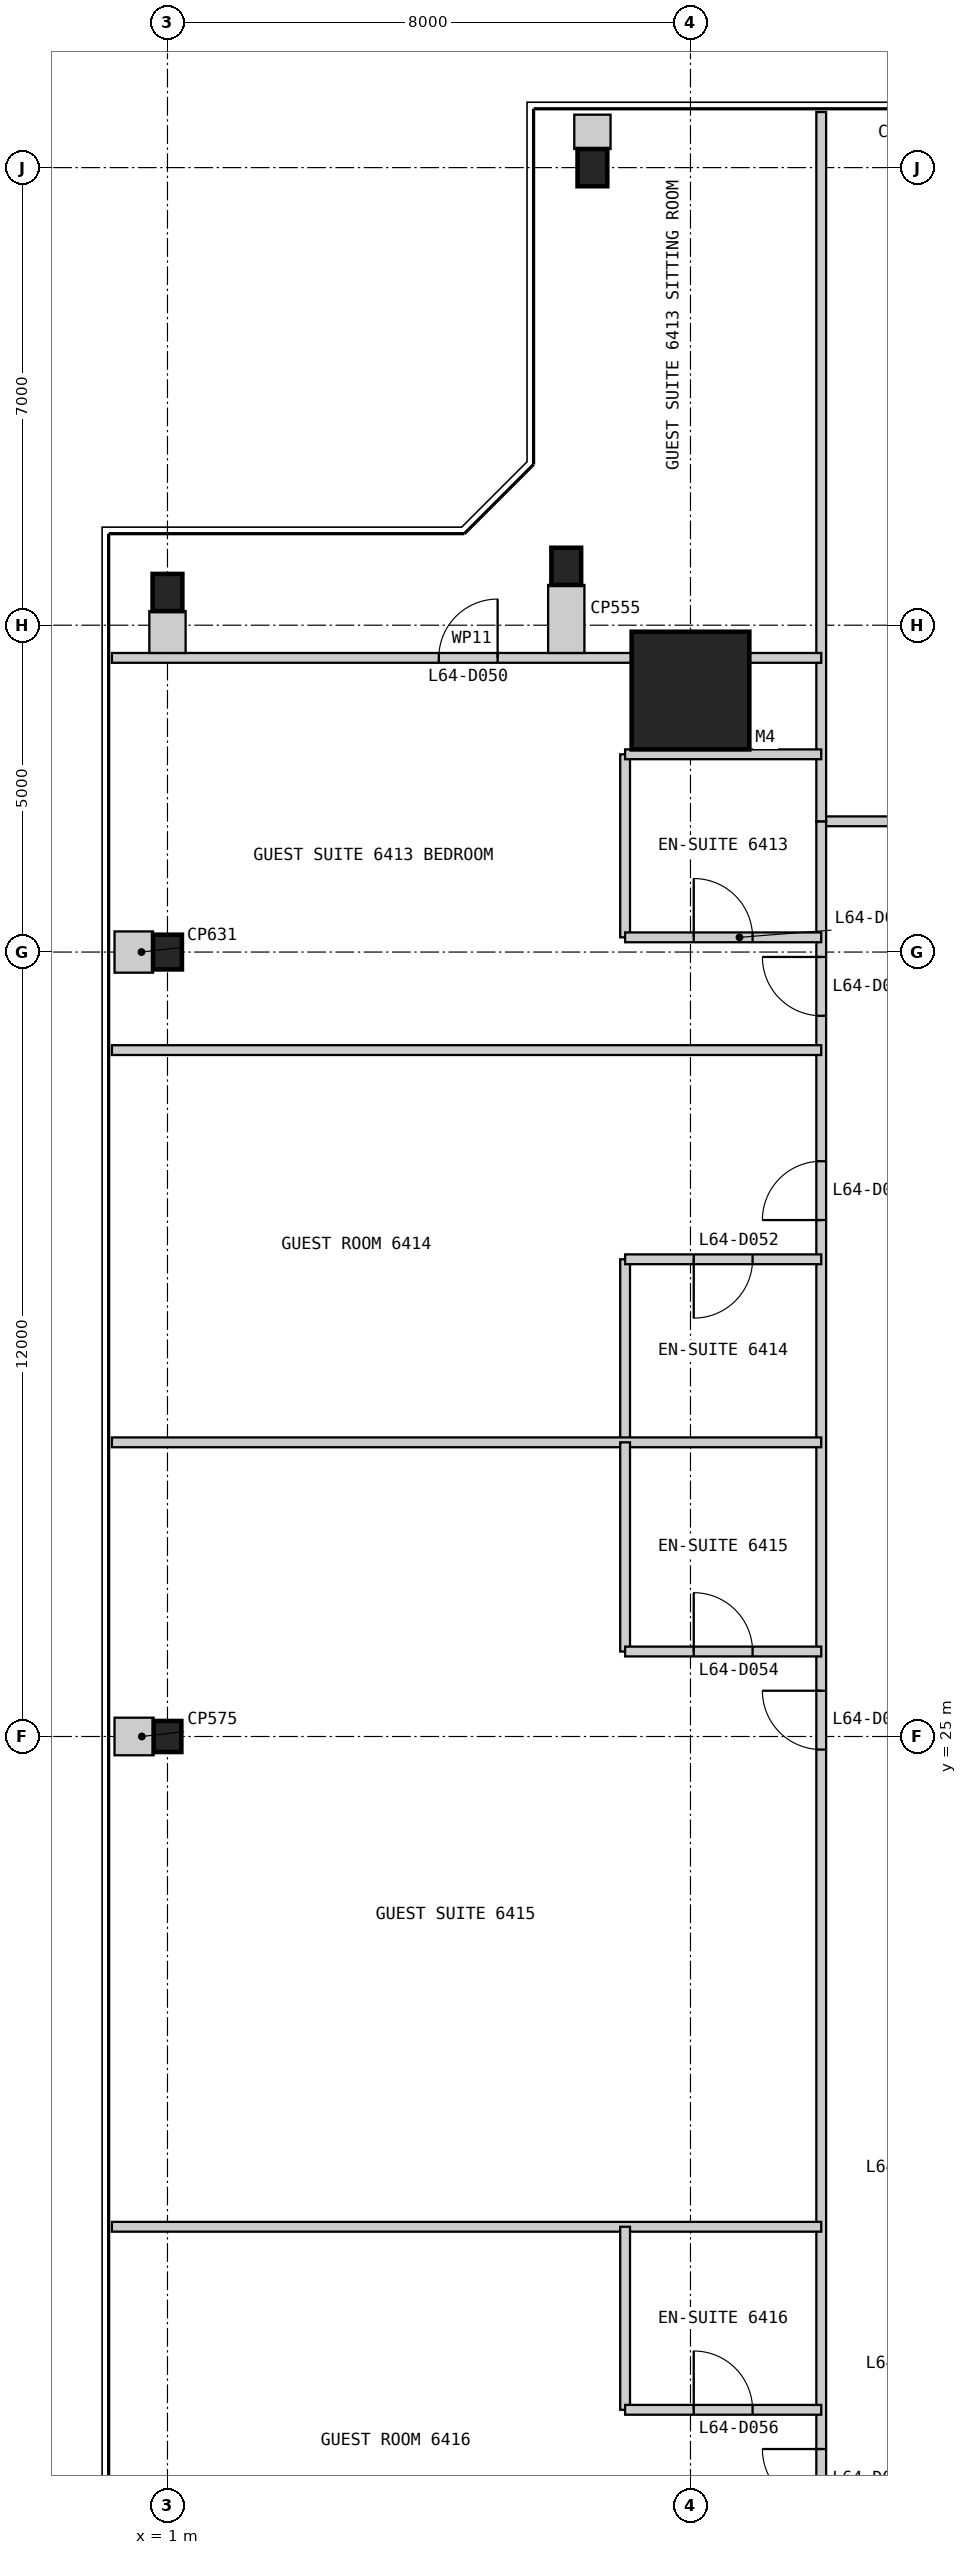
"""IFC4 building model, lengths in metres.
Left out: names, types, materials, properties, quantities, classifications, styles, units other than length and angle.
Written with IfcOpenShell. Run it as: python <this file> out.ifc"""

import sys

from ifc_helpers import new_model, si_unit, direction, frame, frame_2d, origin, origin_2d, place, context, subcontext, project, spatial, rectangle, i_section, extrude, element, fill, save


model = new_model("IFC4")
c1 = context("Model", 3, precision=1e-05, world=origin(), true_north=direction((0.0, 1.0)))
c2 = subcontext(c1, "Body", "Model", "MODEL_VIEW")
j1 = project(units=[si_unit("LENGTHUNIT", "METRE"), si_unit("PLANEANGLEUNIT", "RADIAN")], contexts=[c1])
p1 = place(None, origin())
s1 = spatial("IfcSite", under=j1, at=p1, CompositionType="ELEMENT")
p2 = place(p1, origin())
s2 = spatial("IfcBuilding", under=s1, at=p2, CompositionType="ELEMENT")
p3 = place(p2, frame((0.0, 0.0, 269.6)))
s3 = spatial("IfcBuildingStorey", under=s2, at=p3, CompositionType="ELEMENT", Elevation=269.6)
p4 = place(p3, frame((9.0, 41.0, 0.0), z_axis=(0.0, 0.0, 1.0), x_axis=(1.0, 0.0, 0.0)))
e1 = element("IfcColumn", 1, at=p4, inside=s3, PredefinedType="COLUMN", context=c2, shape_type="SweptSolid", body=[
    extrude(rectangle(XDim=1.8, YDim=1.8, at=origin_2d()), origin(), (0.0, 0.0, 1.0), 3.4),
])
for number, where, z_axis, x_axis in (
    (2, (7.5, 49.0, 0.0), (0.0, 0.0, 1.0), (1.0, 0.0, 0.0)),
    (3, (7.1, 42.9, 0.0), (0.0, 0.0, 1.0), (1.0, 0.0, 0.0)),
    (4, (1.0, 42.5, 0.0), (0.0, 0.0, 1.0), (1.0, 0.0, 0.0)),
):
    element("IfcColumn", number, at=place(p3, frame(where, z_axis=z_axis, x_axis=x_axis)), inside=s3, PredefinedType="COLUMN", context=c2, shape_type="SweptSolid", body=[
        extrude(i_section(OverallWidth=0.455, OverallDepth=0.569, WebThickness=0.078, FlangeThickness=0.125, at=origin_2d()), origin(), (0.0, 0.0, 1.0), 3.4),
    ])
p5 = place(p3, frame((1.0, 37.0, 0.0), z_axis=(0.0, 0.0, 1.0), x_axis=(1.0, 0.0, 0.0)))
e5 = element("IfcColumn", 5, at=p5, inside=s3, PredefinedType="COLUMN", context=c2, shape_type="SweptSolid", body=[
    extrude(i_section(OverallWidth=0.442, OverallDepth=0.531, WebThickness=0.066, FlangeThickness=0.106, at=origin_2d()), origin(), (0.0, 0.0, 1.0), 3.4),
])
p6 = place(p3, frame((1.0, 25.0, 0.0), z_axis=(0.0, 0.0, 1.0), x_axis=(1.0, 0.0, 0.0)))
e6 = element("IfcColumn", 6, at=p6, inside=s3, PredefinedType="COLUMN", context=c2, shape_type="SweptSolid", body=[
    extrude(i_section(OverallWidth=0.424, OverallDepth=0.475, WebThickness=0.048, FlangeThickness=0.077, at=origin_2d()), origin(), (0.0, 0.0, 1.0), 3.4),
])
p7 = place(p3, frame((39.0, 39.0, 0.0), z_axis=(0.0, 0.0, 1.0), x_axis=(-1.0, 0.0, 0.0)))
e7 = element("IfcWall", 7, at=p7, inside=s3, PredefinedType="PARTITIONING", context=c2, shape_type="SweptSolid", body=[
    extrude(rectangle(XDim=28.0, YDim=0.15, at=frame_2d((14.0, 0.0))), origin(), (0.0, 0.0, 1.0), 2.844),
])
p8 = place(p7, frame((1.9, 0.0, 0.0)))
e8 = element("IfcOpeningElement", 8, at=p8, cuts=e7, PredefinedType="OPENING", context=c2, shape_type="SweptSolid", body=[
    extrude(rectangle(XDim=0.9, YDim=2.1, at=frame_2d((0.45, 1.05))), frame((0.0, 0.085, 0.0), z_axis=(0.0, -1.0, 0.0), x_axis=(1.0, 0.0, 0.0)), (0.0, 0.0, 1.0), 0.17),
])
p9 = place(p7, frame((5.2, 0.0, 0.0)))
e9 = element("IfcOpeningElement", 9, at=p9, cuts=e7, PredefinedType="OPENING", context=c2, shape_type="SweptSolid", body=[
    extrude(rectangle(XDim=0.9, YDim=2.1, at=frame_2d((0.45, 1.05))), frame((0.0, 0.085, 0.0), z_axis=(0.0, -1.0, 0.0), x_axis=(1.0, 0.0, 0.0)), (0.0, 0.0, 1.0), 0.17),
])
p10 = place(p7, frame((13.3, 0.0, 0.0)))
e10 = element("IfcOpeningElement", 10, at=p10, cuts=e7, PredefinedType="OPENING", context=c2, shape_type="SweptSolid", body=[
    extrude(rectangle(XDim=0.9, YDim=2.1, at=frame_2d((0.45, 1.05))), frame((0.0, 0.085, 0.0), z_axis=(0.0, -1.0, 0.0), x_axis=(1.0, 0.0, 0.0)), (0.0, 0.0, 1.0), 0.17),
])
p11 = place(p7, frame((24.9, 0.0, 0.0)))
e11 = element("IfcOpeningElement", 11, at=p11, cuts=e7, PredefinedType="OPENING", context=c2, shape_type="SweptSolid", body=[
    extrude(rectangle(XDim=0.9, YDim=2.1, at=frame_2d((0.45, 1.05))), frame((0.0, 0.085, 0.0), z_axis=(0.0, -1.0, 0.0), x_axis=(1.0, 0.0, 0.0)), (0.0, 0.0, 1.0), 0.17),
])
p12 = place(p3, frame((11.0, 39.0, 0.0), z_axis=(0.0, 0.0, 1.0), x_axis=(0.0, -1.0, 0.0)))
e12 = element("IfcWall", 12, at=p12, inside=s3, PredefinedType="PARTITIONING", context=c2, shape_type="SweptSolid", body=[
    extrude(rectangle(XDim=28.0, YDim=0.15, at=frame_2d((14.0, 0.0))), origin(), (0.0, 0.0, 1.0), 2.844),
])
p13 = place(p12, frame((2.075, 0.0, 0.0)))
e13 = element("IfcOpeningElement", 13, at=p13, cuts=e12, PredefinedType="OPENING", context=c2, shape_type="SweptSolid", body=[
    extrude(rectangle(XDim=0.9, YDim=2.1, at=frame_2d((0.45, 1.05))), frame((0.0, 0.085, 0.0), z_axis=(0.0, -1.0, 0.0), x_axis=(1.0, 0.0, 0.0)), (0.0, 0.0, 1.0), 0.17),
])
p14 = place(p12, frame((5.2, 0.0, 0.0)))
e14 = element("IfcOpeningElement", 14, at=p14, cuts=e12, PredefinedType="OPENING", context=c2, shape_type="SweptSolid", body=[
    extrude(rectangle(XDim=0.9, YDim=2.1, at=frame_2d((0.45, 1.05))), frame((0.0, 0.085, 0.0), z_axis=(0.0, -1.0, 0.0), x_axis=(1.0, 0.0, 0.0)), (0.0, 0.0, 1.0), 0.17),
])
p15 = place(p12, frame((13.3, 0.0, 0.0)))
e15 = element("IfcOpeningElement", 15, at=p15, cuts=e12, PredefinedType="OPENING", context=c2, shape_type="SweptSolid", body=[
    extrude(rectangle(XDim=0.9, YDim=2.1, at=frame_2d((0.45, 1.05))), frame((0.0, 0.085, 0.0), z_axis=(0.0, -1.0, 0.0), x_axis=(1.0, 0.0, 0.0)), (0.0, 0.0, 1.0), 0.17),
])
p16 = place(p12, frame((24.9, 0.0, 0.0)))
e16 = element("IfcOpeningElement", 16, at=p16, cuts=e12, PredefinedType="OPENING", context=c2, shape_type="SweptSolid", body=[
    extrude(rectangle(XDim=0.9, YDim=2.1, at=frame_2d((0.45, 1.05))), frame((0.0, 0.085, 0.0), z_axis=(0.0, -1.0, 0.0), x_axis=(1.0, 0.0, 0.0)), (0.0, 0.0, 1.0), 0.17),
])
p17 = place(p3, frame((11.0, 49.85, 0.0), z_axis=(0.0, 0.0, 1.0), x_axis=(0.0, -1.0, 0.0)))
e17 = element("IfcWall", 17, at=p17, inside=s3, PredefinedType="PARTITIONING", context=c2, shape_type="SweptSolid", body=[
    extrude(rectangle(XDim=10.85, YDim=0.15, at=frame_2d((5.425, 0.0))), origin(), (0.0, 0.0, 1.0), 2.844),
])
p18 = place(p3, frame((8.0, 40.025, 0.0), z_axis=(0.0, 0.0, 1.0), x_axis=(0.0, -1.0, 0.0)))
e18 = element("IfcWall", 18, at=p18, inside=s3, PredefinedType="PARTITIONING", context=c2, shape_type="SweptSolid", body=[
    extrude(rectangle(XDim=2.8, YDim=0.15, at=frame_2d((1.4, 0.0))), origin(), (0.0, 0.0, 1.0), 3.25),
])
p19 = place(p3, frame((8.0, 37.225, 0.0), z_axis=(0.0, 0.0, 1.0), x_axis=(1.0, 0.0, 0.0)))
e19 = element("IfcWall", 19, at=p19, inside=s3, PredefinedType="PARTITIONING", context=c2, shape_type="SweptSolid", body=[
    extrude(rectangle(XDim=3.0, YDim=0.15, at=frame_2d((1.5, 0.0))), origin(), (0.0, 0.0, 1.0), 3.25),
])
p20 = place(p19, frame((1.05, 0.0, 0.0)))
e20 = element("IfcOpeningElement", 20, at=p20, cuts=e19, PredefinedType="OPENING", context=c2, shape_type="SweptSolid", body=[
    extrude(rectangle(XDim=0.9, YDim=2.1, at=frame_2d((0.45, 1.05))), frame((0.0, 0.085, 0.0), z_axis=(0.0, -1.0, 0.0), x_axis=(1.0, 0.0, 0.0)), (0.0, 0.0, 1.0), 0.17),
])
p21 = place(p3, frame((8.0, 40.025, 0.0), z_axis=(0.0, 0.0, 1.0), x_axis=(1.0, 0.0, 0.0)))
e21 = element("IfcWall", 21, at=p21, inside=s3, PredefinedType="PARTITIONING", context=c2, shape_type="SweptSolid", body=[
    extrude(rectangle(XDim=3.0, YDim=0.15, at=frame_2d((1.5, 0.0))), origin(), (0.0, 0.0, 1.0), 3.25),
])
p22 = place(p3, frame((0.15, 41.5, 0.0), z_axis=(0.0, 0.0, 1.0), x_axis=(1.0, 0.0, 0.0)))
e22 = element("IfcWall", 22, at=p22, inside=s3, PredefinedType="PARTITIONING", context=c2, shape_type="SweptSolid", body=[
    extrude(rectangle(XDim=10.85, YDim=0.15, at=frame_2d((5.425, 0.0))), origin(), (0.0, 0.0, 1.0), 3.25),
])
p23 = place(p22, frame((5.0, 0.0, 0.0)))
e23 = element("IfcOpeningElement", 23, at=p23, cuts=e22, PredefinedType="OPENING", context=c2, shape_type="SweptSolid", body=[
    extrude(rectangle(XDim=0.9, YDim=2.1, at=frame_2d((0.45, 1.05))), frame((0.0, 0.085, 0.0), z_axis=(0.0, -1.0, 0.0), x_axis=(1.0, 0.0, 0.0)), (0.0, 0.0, 1.0), 0.17),
])
p24 = place(p3, frame((0.15, 35.5, 0.0), z_axis=(0.0, 0.0, 1.0), x_axis=(1.0, 0.0, 0.0)))
e24 = element("IfcWall", 24, at=p24, inside=s3, PredefinedType="PARTITIONING", context=c2, shape_type="SweptSolid", body=[
    extrude(rectangle(XDim=10.85, YDim=0.15, at=frame_2d((5.425, 0.0))), origin(), (0.0, 0.0, 1.0), 3.25),
])
p25 = place(p3, frame((8.0, 32.3, 0.0), z_axis=(0.0, 0.0, 1.0), x_axis=(0.0, -1.0, 0.0)))
e25 = element("IfcWall", 25, at=p25, inside=s3, PredefinedType="PARTITIONING", context=c2, shape_type="SweptSolid", body=[
    extrude(rectangle(XDim=2.8, YDim=0.15, at=frame_2d((1.4, 0.0))), origin(), (0.0, 0.0, 1.0), 3.25),
])
p26 = place(p3, frame((8.0, 32.3, 0.0), z_axis=(0.0, 0.0, 1.0), x_axis=(1.0, 0.0, 0.0)))
e26 = element("IfcWall", 26, at=p26, inside=s3, PredefinedType="PARTITIONING", context=c2, shape_type="SweptSolid", body=[
    extrude(rectangle(XDim=3.0, YDim=0.15, at=frame_2d((1.5, 0.0))), origin(), (0.0, 0.0, 1.0), 3.25),
])
p27 = place(p26, frame((1.05, 0.0, 0.0)))
e27 = element("IfcOpeningElement", 27, at=p27, cuts=e26, PredefinedType="OPENING", context=c2, shape_type="SweptSolid", body=[
    extrude(rectangle(XDim=0.9, YDim=2.1, at=frame_2d((0.45, 1.05))), frame((0.0, 0.085, 0.0), z_axis=(0.0, -1.0, 0.0), x_axis=(1.0, 0.0, 0.0)), (0.0, 0.0, 1.0), 0.17),
])
p28 = place(p3, frame((0.15, 29.5, 0.0), z_axis=(0.0, 0.0, 1.0), x_axis=(1.0, 0.0, 0.0)))
e28 = element("IfcWall", 28, at=p28, inside=s3, PredefinedType="PARTITIONING", context=c2, shape_type="SweptSolid", body=[
    extrude(rectangle(XDim=10.85, YDim=0.15, at=frame_2d((5.425, 0.0))), origin(), (0.0, 0.0, 1.0), 3.25),
])
p29 = place(p3, frame((8.0, 29.5, 0.0), z_axis=(0.0, 0.0, 1.0), x_axis=(0.0, -1.0, 0.0)))
e29 = element("IfcWall", 29, at=p29, inside=s3, PredefinedType="PARTITIONING", context=c2, shape_type="SweptSolid", body=[
    extrude(rectangle(XDim=3.2, YDim=0.15, at=frame_2d((1.6, 0.0))), origin(), (0.0, 0.0, 1.0), 3.25),
])
p30 = place(p3, frame((8.0, 26.3, 0.0), z_axis=(0.0, 0.0, 1.0), x_axis=(1.0, 0.0, 0.0)))
e30 = element("IfcWall", 30, at=p30, inside=s3, PredefinedType="PARTITIONING", context=c2, shape_type="SweptSolid", body=[
    extrude(rectangle(XDim=3.0, YDim=0.15, at=frame_2d((1.5, 0.0))), origin(), (0.0, 0.0, 1.0), 3.25),
])
p31 = place(p30, frame((1.05, 0.0, 0.0)))
e31 = element("IfcOpeningElement", 31, at=p31, cuts=e30, PredefinedType="OPENING", context=c2, shape_type="SweptSolid", body=[
    extrude(rectangle(XDim=0.9, YDim=2.1, at=frame_2d((0.45, 1.05))), frame((0.0, 0.085, 0.0), z_axis=(0.0, -1.0, 0.0), x_axis=(1.0, 0.0, 0.0)), (0.0, 0.0, 1.0), 0.17),
])
p32 = place(p3, frame((0.15, 17.5, 0.0), z_axis=(0.0, 0.0, 1.0), x_axis=(1.0, 0.0, 0.0)))
e32 = element("IfcWall", 32, at=p32, inside=s3, PredefinedType="PARTITIONING", context=c2, shape_type="SweptSolid", body=[
    extrude(rectangle(XDim=10.85, YDim=0.15, at=frame_2d((5.425, 0.0))), origin(), (0.0, 0.0, 1.0), 3.25),
])
p33 = place(p3, frame((8.0, 17.5, 0.0), z_axis=(0.0, 0.0, 1.0), x_axis=(0.0, -1.0, 0.0)))
e33 = element("IfcWall", 33, at=p33, inside=s3, PredefinedType="PARTITIONING", context=c2, shape_type="SweptSolid", body=[
    extrude(rectangle(XDim=2.8, YDim=0.15, at=frame_2d((1.4, 0.0))), origin(), (0.0, 0.0, 1.0), 3.25),
])
p34 = place(p3, frame((8.0, 14.7, 0.0), z_axis=(0.0, 0.0, 1.0), x_axis=(1.0, 0.0, 0.0)))
e34 = element("IfcWall", 34, at=p34, inside=s3, PredefinedType="PARTITIONING", context=c2, shape_type="SweptSolid", body=[
    extrude(rectangle(XDim=3.0, YDim=0.15, at=frame_2d((1.5, 0.0))), origin(), (0.0, 0.0, 1.0), 3.25),
])
p35 = place(p34, frame((1.05, 0.0, 0.0)))
e35 = element("IfcOpeningElement", 35, at=p35, cuts=e34, PredefinedType="OPENING", context=c2, shape_type="SweptSolid", body=[
    extrude(rectangle(XDim=0.9, YDim=2.1, at=frame_2d((0.45, 1.05))), frame((0.0, 0.085, 0.0), z_axis=(0.0, -1.0, 0.0), x_axis=(1.0, 0.0, 0.0)), (0.0, 0.0, 1.0), 0.17),
])
p36 = place(p3, frame((7.5, 49.81, 0.0), z_axis=(0.0, 0.0, 1.0), x_axis=(0.0, -1.0, 0.0)))
e36 = element("IfcWall", 36, at=p36, inside=s3, PredefinedType="PARTITIONING", context=c2, shape_type="SweptSolid", body=[
    extrude(rectangle(XDim=0.526, YDim=0.555, at=frame_2d((0.263, 0.0))), origin(), (0.0, 0.0, 1.0), 3.25),
])
p37 = place(p3, frame((7.1, 41.575, 0.0), z_axis=(0.0, 0.0, 1.0), x_axis=(0.0, 1.0, 0.0)))
e37 = element("IfcWall", 37, at=p37, inside=s3, PredefinedType="PARTITIONING", context=c2, shape_type="SweptSolid", body=[
    extrude(rectangle(XDim=1.041, YDim=0.555, at=frame_2d((0.52, 0.0))), origin(), (0.0, 0.0, 1.0), 3.25),
])
p38 = place(p3, frame((1.0, 41.575, 0.0), z_axis=(0.0, 0.0, 1.0), x_axis=(0.0, 1.0, 0.0)))
e38 = element("IfcWall", 38, at=p38, inside=s3, PredefinedType="PARTITIONING", context=c2, shape_type="SweptSolid", body=[
    extrude(rectangle(XDim=0.641, YDim=0.555, at=frame_2d((0.32, 0.0))), origin(), (0.0, 0.0, 1.0), 2.338),
])
p39 = place(p3, frame((0.19, 37.0, 0.0), z_axis=(0.0, 0.0, 1.0), x_axis=(1.0, 0.0, 0.0)))
e39 = element("IfcWall", 39, at=p39, inside=s3, PredefinedType="PARTITIONING", context=c2, shape_type="SweptSolid", body=[
    extrude(rectangle(XDim=0.589, YDim=0.631, at=frame_2d((0.294, 0.0))), origin(), (0.0, 0.0, 1.0), 3.25),
])
p40 = place(p3, frame((0.19, 25.0, 0.0), z_axis=(0.0, 0.0, 1.0), x_axis=(1.0, 0.0, 0.0)))
e40 = element("IfcWall", 40, at=p40, inside=s3, PredefinedType="PARTITIONING", context=c2, shape_type="SweptSolid", body=[
    extrude(rectangle(XDim=0.598, YDim=0.575, at=frame_2d((0.299, 0.0))), origin(), (0.0, 0.0, 1.0), 3.25),
])
p41 = place(p20, origin())
e41 = element("IfcDoor", 41, at=p41, inside=s3, OperationType="SINGLE_SWING_LEFT", PredefinedType="DOOR", context=c2, shape_type="SweptSolid", body=[
    extrude(rectangle(XDim=0.9, YDim=2.1, at=frame_2d((0.45, 1.05))), frame((0.0, 0.025, 0.0), z_axis=(0.0, -1.0, 0.0), x_axis=(1.0, 0.0, 0.0)), (0.0, 0.0, 1.0), 0.05),
])
fill(e20, e41)
p42 = place(p23, origin())
e42 = element("IfcDoor", 42, at=p42, inside=s3, OperationType="SINGLE_SWING_RIGHT", PredefinedType="DOOR", context=c2, shape_type="SweptSolid", body=[
    extrude(rectangle(XDim=0.9, YDim=2.1, at=frame_2d((0.45, 1.05))), frame((0.0, 0.025, 0.0), z_axis=(0.0, -1.0, 0.0), x_axis=(1.0, 0.0, 0.0)), (0.0, 0.0, 1.0), 0.05),
])
fill(e23, e42)
p43 = place(p13, frame((0.9, 0.0, 0.0), z_axis=(0.0, 0.0, 1.0), x_axis=(-1.0, 0.0, 0.0)))
e43 = element("IfcDoor", 43, at=p43, inside=s3, OperationType="SINGLE_SWING_RIGHT", PredefinedType="DOOR", context=c2, shape_type="SweptSolid", body=[
    extrude(rectangle(XDim=0.9, YDim=2.1, at=frame_2d((0.45, 1.05))), frame((0.0, 0.025, 0.0), z_axis=(0.0, -1.0, 0.0), x_axis=(1.0, 0.0, 0.0)), (0.0, 0.0, 1.0), 0.05),
])
fill(e13, e43)
p44 = place(p27, frame((0.9, 0.0, 0.0), z_axis=(0.0, 0.0, 1.0), x_axis=(-1.0, 0.0, 0.0)))
e44 = element("IfcDoor", 44, at=p44, inside=s3, OperationType="SINGLE_SWING_RIGHT", PredefinedType="DOOR", context=c2, shape_type="SweptSolid", body=[
    extrude(rectangle(XDim=0.9, YDim=2.1, at=frame_2d((0.45, 1.05))), frame((0.0, 0.025, 0.0), z_axis=(0.0, -1.0, 0.0), x_axis=(1.0, 0.0, 0.0)), (0.0, 0.0, 1.0), 0.05),
])
fill(e27, e44)
p45 = place(p14, frame((0.9, 0.0, 0.0), z_axis=(0.0, 0.0, 1.0), x_axis=(-1.0, 0.0, 0.0)))
e45 = element("IfcDoor", 45, at=p45, inside=s3, OperationType="SINGLE_SWING_LEFT", PredefinedType="DOOR", context=c2, shape_type="SweptSolid", body=[
    extrude(rectangle(XDim=0.9, YDim=2.1, at=frame_2d((0.45, 1.05))), frame((0.0, 0.025, 0.0), z_axis=(0.0, -1.0, 0.0), x_axis=(1.0, 0.0, 0.0)), (0.0, 0.0, 1.0), 0.05),
])
fill(e14, e45)
p46 = place(p31, origin())
e46 = element("IfcDoor", 46, at=p46, inside=s3, OperationType="SINGLE_SWING_LEFT", PredefinedType="DOOR", context=c2, shape_type="SweptSolid", body=[
    extrude(rectangle(XDim=0.9, YDim=2.1, at=frame_2d((0.45, 1.05))), frame((0.0, 0.025, 0.0), z_axis=(0.0, -1.0, 0.0), x_axis=(1.0, 0.0, 0.0)), (0.0, 0.0, 1.0), 0.05),
])
fill(e31, e46)
p47 = place(p15, frame((0.9, 0.0, 0.0), z_axis=(0.0, 0.0, 1.0), x_axis=(-1.0, 0.0, 0.0)))
e47 = element("IfcDoor", 47, at=p47, inside=s3, OperationType="SINGLE_SWING_RIGHT", PredefinedType="DOOR", context=c2, shape_type="SweptSolid", body=[
    extrude(rectangle(XDim=0.9, YDim=2.1, at=frame_2d((0.45, 1.05))), frame((0.0, 0.025, 0.0), z_axis=(0.0, -1.0, 0.0), x_axis=(1.0, 0.0, 0.0)), (0.0, 0.0, 1.0), 0.05),
])
fill(e15, e47)
p48 = place(p35, origin())
e48 = element("IfcDoor", 48, at=p48, inside=s3, OperationType="SINGLE_SWING_LEFT", PredefinedType="DOOR", context=c2, shape_type="SweptSolid", body=[
    extrude(rectangle(XDim=0.9, YDim=2.1, at=frame_2d((0.45, 1.05))), frame((0.0, 0.025, 0.0), z_axis=(0.0, -1.0, 0.0), x_axis=(1.0, 0.0, 0.0)), (0.0, 0.0, 1.0), 0.05),
])
fill(e35, e48)
p49 = place(p16, frame((0.9, 0.0, 0.0), z_axis=(0.0, 0.0, 1.0), x_axis=(-1.0, 0.0, 0.0)))
e49 = element("IfcDoor", 49, at=p49, inside=s3, OperationType="SINGLE_SWING_RIGHT", PredefinedType="DOOR", context=c2, shape_type="SweptSolid", body=[
    extrude(rectangle(XDim=0.9, YDim=2.1, at=frame_2d((0.45, 1.05))), frame((0.0, 0.025, 0.0), z_axis=(0.0, -1.0, 0.0), x_axis=(1.0, 0.0, 0.0)), (0.0, 0.0, 1.0), 0.05),
])
fill(e16, e49)
save(model, sys.argv[1])
